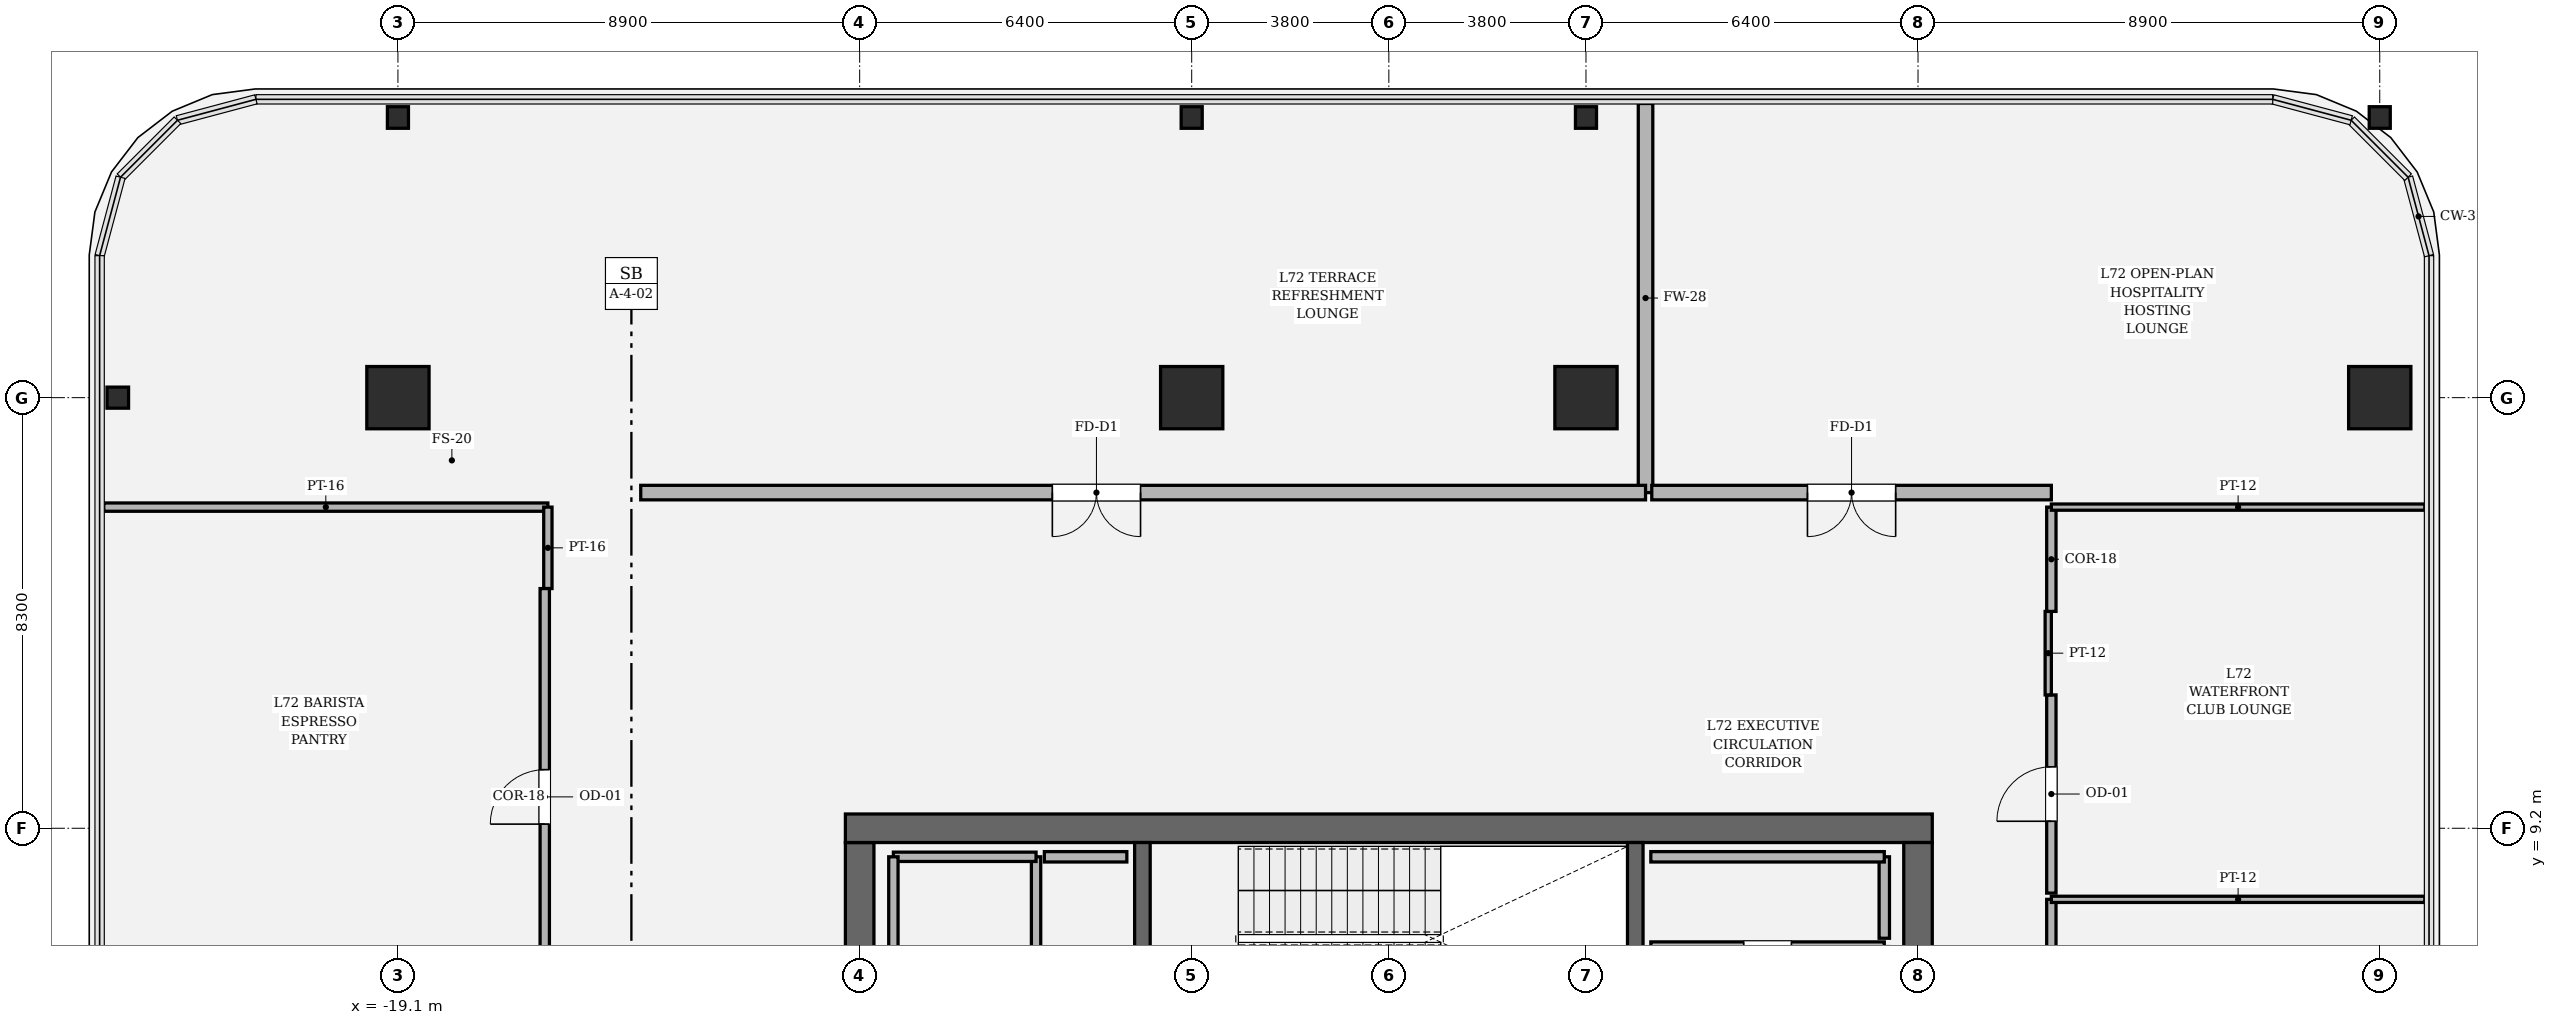
"""IFC4 building model, lengths in metres.
Left out: names, types, materials, properties, quantities, classifications, styles, units other than length and angle.
Written with IfcOpenShell. Run it as: python <this file> out.ifc"""

import sys

from ifc_helpers import new_model, si_unit, direction, frame, frame_2d, origin, origin_2d, place, context, subcontext, project, spatial, rectangle, hollow_rectangle, i_section, extrude, element, fill, save


model = new_model("IFC4")
c1 = context("Model", 3, precision=1e-05, world=origin(), true_north=direction((0.0, 1.0)))
c2 = subcontext(c1, "Body", "Model", "MODEL_VIEW")
j1 = project(units=[si_unit("LENGTHUNIT", "METRE"), si_unit("PLANEANGLEUNIT", "RADIAN")], contexts=[c1])
p1 = place(None, origin())
s1 = spatial("IfcSite", under=j1, at=p1, CompositionType="ELEMENT")
p2 = place(p1, origin())
s2 = spatial("IfcBuilding", under=s1, at=p2, CompositionType="ELEMENT")
p3 = place(p2, frame((0.0, 0.0, 304.8)))
s3 = spatial("IfcBuildingStorey", under=s2, at=p3, CompositionType="ELEMENT", Elevation=304.8)
p4 = place(p3, frame((-10.2, -8.925, 0.0), z_axis=(0.0, 0.0, 1.0), x_axis=(0.0, 1.0, 0.0)))
e1 = element("IfcWall", 1, at=p4, inside=s3, PredefinedType="SHEAR", context=c2, shape_type="SweptSolid", body=[
    extrude(rectangle(XDim=17.85, YDim=0.55, at=frame_2d((8.925, 0.0))), origin(), (0.0, 0.0, 1.0), 4.2),
])
p5 = place(p4, frame((12.715, 0.0, 0.0)))
e2 = element("IfcOpeningElement", 2, at=p5, cuts=e1, PredefinedType="OPENING", context=c2, shape_type="SweptSolid", body=[
    extrude(rectangle(XDim=1.18, YDim=2.2, at=frame_2d((0.59, 1.1))), frame((0.0, 0.285, 0.0), z_axis=(0.0, -1.0, 0.0), x_axis=(1.0, 0.0, 0.0)), (0.0, 0.0, 1.0), 0.57),
])
p6 = place(p3, frame((-10.475, 9.2, 0.0), z_axis=(0.0, 0.0, 1.0), x_axis=(1.0, 0.0, 0.0)))
e3 = element("IfcWall", 3, at=p6, inside=s3, PredefinedType="SHEAR", context=c2, shape_type="SweptSolid", body=[
    extrude(rectangle(XDim=20.95, YDim=0.55, at=frame_2d((10.475, 0.0))), origin(), (0.0, 0.0, 1.0), 4.2),
])
p7 = place(p3, frame((10.2, 8.925, 0.0), z_axis=(0.0, 0.0, 1.0), x_axis=(0.0, -1.0, 0.0)))
e4 = element("IfcWall", 4, at=p7, inside=s3, PredefinedType="SHEAR", context=c2, shape_type="SweptSolid", body=[
    extrude(rectangle(XDim=17.85, YDim=0.55, at=frame_2d((8.925, 0.0))), origin(), (0.0, 0.0, 1.0), 4.2),
])
p8 = place(p7, frame((3.955, 0.0, 0.0)))
e5 = element("IfcOpeningElement", 5, at=p8, cuts=e4, PredefinedType="OPENING", context=c2, shape_type="SweptSolid", body=[
    extrude(rectangle(XDim=1.18, YDim=2.2, at=frame_2d((0.59, 1.1))), frame((0.0, 0.285, 0.0), z_axis=(0.0, -1.0, 0.0), x_axis=(1.0, 0.0, 0.0)), (0.0, 0.0, 1.0), 0.57),
])
for number, where, z_axis, x_axis in (
    (6, (-4.75, 5.3, 0.0), (0.0, 0.0, 1.0), (0.0, 1.0, 0.0)),
    (7, (4.75, 8.925, 0.0), (0.0, 0.0, 1.0), (0.0, -1.0, 0.0)),
):
    element("IfcWall", number, at=place(p3, frame(where, z_axis=z_axis, x_axis=x_axis)), inside=s3, PredefinedType="SOLIDWALL", context=c2, shape_type="SweptSolid", body=[
        extrude(rectangle(XDim=3.625, YDim=0.3, at=frame_2d((1.812, 0.0))), origin(), (0.0, 0.0, 1.0), 4.2),
    ])
for number, where, z_axis, x_axis in (
    (8, (19.1, 17.5, 0.0), (0.0, 0.0, 1.0), (1.0, 0.0, 0.0)),
    (9, (3.8, 17.5, 0.0), (0.0, 0.0, 1.0), (1.0, 0.0, 0.0)),
    (10, (-3.8, 17.5, 0.0), (0.0, 0.0, 1.0), (1.0, 0.0, 0.0)),
    (11, (-19.1, 17.5, 0.0), (0.0, 0.0, 1.0), (1.0, 0.0, 0.0)),
):
    element("IfcColumn", number, at=place(p3, frame(where, z_axis=z_axis, x_axis=x_axis)), inside=s3, PredefinedType="COLUMN", context=c2, shape_type="SweptSolid", body=[
        extrude(hollow_rectangle(XDim=1.2, YDim=1.2, WallThickness=0.035, at=origin_2d()), origin(), (0.0, 0.0, 1.0), 4.2),
    ])
for number, where, z_axis, x_axis in (
    (12, (-19.1, 22.9, 0.0), (0.0, 0.0, 1.0), (1.0, 0.0, 0.0)),
    (13, (-3.8, 22.9, 0.0), (0.0, 0.0, 1.0), (1.0, 0.0, 0.0)),
    (14, (3.8, 22.9, 0.0), (0.0, 0.0, 1.0), (1.0, 0.0, 0.0)),
    (15, (19.1, 22.9, 0.0), (0.0, 0.0, 1.0), (1.0, 0.0, 0.0)),
    (16, (-24.5, 17.5, 0.0), (0.0, 0.0, 1.0), (0.0, 1.0, 0.0)),
):
    element("IfcColumn", number, at=place(p3, frame(where, z_axis=z_axis, x_axis=x_axis)), inside=s3, PredefinedType="COLUMN", context=c2, shape_type="SweptSolid", body=[
        extrude(i_section(OverallWidth=0.406, OverallDepth=0.416, WebThickness=0.029, FlangeThickness=0.048, FilletRadius=0.018, at=origin_2d()), origin(), (0.0, 0.0, 1.0), 4.198),
    ])
p9 = place(p3, frame((-6.8, 5.38, 0.0), z_axis=(0.0, 0.0, 1.0), x_axis=(0.0, 1.0, 0.0)))
e17 = element("IfcWall", 17, at=p9, inside=s3, PredefinedType="PARTITIONING", context=c2, shape_type="SweptSolid", body=[
    extrude(rectangle(XDim=3.27, YDim=0.18, at=frame_2d((1.635, 0.0))), origin(), (0.0, 0.0, 1.0), 4.0),
])
p10 = place(p3, frame((-6.8, 8.65, 0.0), z_axis=(0.0, 0.0, 1.0), x_axis=(-1.0, 0.0, 0.0)))
e18 = element("IfcWall", 18, at=p10, inside=s3, PredefinedType="PARTITIONING", context=c2, shape_type="SweptSolid", body=[
    extrude(rectangle(XDim=2.75, YDim=0.18, at=frame_2d((1.375, 0.0))), origin(), (0.0, 0.0, 1.0), 4.0),
])
p11 = place(p3, frame((-9.55, 8.65, 0.0), z_axis=(0.0, 0.0, 1.0), x_axis=(0.0, -1.0, 0.0)))
e19 = element("IfcWall", 19, at=p11, inside=s3, PredefinedType="PARTITIONING", context=c2, shape_type="SweptSolid", body=[
    extrude(rectangle(XDim=3.27, YDim=0.18, at=frame_2d((1.635, 0.0))), origin(), (0.0, 0.0, 1.0), 4.0),
])
p12 = place(p3, frame((-5.05, 8.65, 0.0), z_axis=(0.0, 0.0, 1.0), x_axis=(-1.0, 0.0, 0.0)))
e20 = element("IfcWall", 20, at=p12, inside=s3, PredefinedType="SOLIDWALL", context=c2, shape_type="SweptSolid", body=[
    extrude(rectangle(XDim=1.59, YDim=0.2, at=frame_2d((0.795, 0.0))), origin(), (0.0, 0.0, 1.0), 4.0),
])
p13 = place(p3, frame((9.55, 6.92, 0.0), z_axis=(0.0, 0.0, 1.0), x_axis=(-1.0, 0.0, 0.0)))
e21 = element("IfcWall", 21, at=p13, inside=s3, PredefinedType="PARTITIONING", context=c2, shape_type="SweptSolid", body=[
    extrude(rectangle(XDim=4.5, YDim=0.18, at=frame_2d((2.25, 0.0))), origin(), (0.0, 0.0, 1.0), 4.0),
])
p14 = place(p13, frame((1.79, 0.0, 0.0)))
e22 = element("IfcOpeningElement", 22, at=p14, cuts=e21, PredefinedType="OPENING", context=c2, shape_type="SweptSolid", body=[
    extrude(rectangle(XDim=0.92, YDim=2.1, at=frame_2d((0.46, 1.05))), frame((0.0, 0.1, 0.0), z_axis=(0.0, -1.0, 0.0), x_axis=(1.0, 0.0, 0.0)), (0.0, 0.0, 1.0), 0.2),
])
p15 = place(p3, frame((9.55, 7.08, 0.0), z_axis=(0.0, 0.0, 1.0), x_axis=(0.0, 1.0, 0.0)))
e23 = element("IfcWall", 23, at=p15, inside=s3, PredefinedType="SOLIDWALL", context=c2, shape_type="SweptSolid", body=[
    extrude(rectangle(XDim=1.57, YDim=0.2, at=frame_2d((0.785, 0.0))), origin(), (0.0, 0.0, 1.0), 4.0),
])
p16 = place(p3, frame((9.55, 8.65, 0.0), z_axis=(0.0, 0.0, 1.0), x_axis=(-1.0, 0.0, 0.0)))
e24 = element("IfcWall", 24, at=p16, inside=s3, PredefinedType="SOLIDWALL", context=c2, shape_type="SweptSolid", body=[
    extrude(rectangle(XDim=4.5, YDim=0.2, at=frame_2d((2.25, 0.0))), origin(), (0.0, 0.0, 1.0), 4.0),
])
p17 = place(p3, frame((12.77, 1.2, 0.0), z_axis=(0.0, 0.0, 1.0), x_axis=(0.0, 1.0, 0.0)))
e25 = element("IfcWall", 25, at=p17, inside=s3, PredefinedType="PARTITIONING", context=c2, shape_type="SweptSolid", body=[
    extrude(rectangle(XDim=6.63, YDim=0.18, at=frame_2d((3.315, 0.0))), origin(), (0.0, 0.0, 1.0), 3.394),
])
p18 = place(p17, frame((2.79, 0.0, 0.0)))
e26 = element("IfcOpeningElement", 26, at=p18, cuts=e25, PredefinedType="OPENING", context=c2, shape_type="SweptSolid", body=[
    extrude(rectangle(XDim=1.05, YDim=2.2, at=frame_2d((0.525, 1.1))), frame((0.0, 0.1, 0.0), z_axis=(0.0, -1.0, 0.0), x_axis=(1.0, 0.0, 0.0)), (0.0, 0.0, 1.0), 0.2),
])
p19 = place(p3, frame((12.77, 7.83, 0.0), z_axis=(0.0, 0.0, 1.0), x_axis=(1.0, 0.0, 0.0)))
e27 = element("IfcWall", 27, at=p19, inside=s3, PredefinedType="PARTITIONING", context=c2, shape_type="SweptSolid", body=[
    extrude(rectangle(XDim=7.2, YDim=0.12, at=frame_2d((3.6, 0.0))), origin(), (0.0, 0.0, 1.0), 3.394),
])
p20 = place(p3, frame((-24.77, 15.39, 0.0), z_axis=(0.0, 0.0, 1.0), x_axis=(1.0, 0.0, 0.0)))
e28 = element("IfcWall", 28, at=p20, inside=s3, PredefinedType="PARTITIONING", context=c2, shape_type="SweptSolid", body=[
    extrude(rectangle(XDim=8.56, YDim=0.16, at=frame_2d((4.28, 0.0))), origin(), (0.0, 0.0, 1.0), 2.714),
])
p21 = place(p3, frame((-16.21, 15.39, 0.0), z_axis=(0.0, 0.0, 1.0), x_axis=(0.0, -1.0, 0.0)))
e29 = element("IfcWall", 29, at=p21, inside=s3, PredefinedType="PARTITIONING", context=c2, shape_type="SweptSolid", body=[
    extrude(rectangle(XDim=1.57, YDim=0.16, at=frame_2d((0.785, 0.0))), origin(), (0.0, 0.0, 1.0), 4.0),
])
p22 = place(p3, frame((-16.27, 13.82, 0.0), z_axis=(0.0, 0.0, 1.0), x_axis=(0.0, -1.0, 0.0)))
e30 = element("IfcWall", 30, at=p22, inside=s3, PredefinedType="PARTITIONING", context=c2, shape_type="SweptSolid", body=[
    extrude(rectangle(XDim=8.03, YDim=0.18, at=frame_2d((4.015, 0.0))), origin(), (0.0, 0.0, 1.0), 3.394),
])
p23 = place(p22, frame((3.49, 0.0, 0.0)))
e31 = element("IfcOpeningElement", 31, at=p23, cuts=e30, PredefinedType="OPENING", context=c2, shape_type="SweptSolid", body=[
    extrude(rectangle(XDim=1.05, YDim=2.2, at=frame_2d((0.525, 1.1))), frame((0.0, 0.1, 0.0), z_axis=(0.0, -1.0, 0.0), x_axis=(1.0, 0.0, 0.0)), (0.0, 0.0, 1.0), 0.2),
])
p24 = place(p3, frame((12.77, 7.95, 0.0), z_axis=(0.0, 0.0, 1.0), x_axis=(0.0, 1.0, 0.0)))
e32 = element("IfcWall", 32, at=p24, inside=s3, PredefinedType="PARTITIONING", context=c2, shape_type="SweptSolid", body=[
    extrude(rectangle(XDim=3.82, YDim=0.18, at=frame_2d((1.91, 0.0))), origin(), (0.0, 0.0, 1.0), 3.394),
])
p25 = place(p24, frame((1.385, 0.0, 0.0)))
e33 = element("IfcOpeningElement", 33, at=p25, cuts=e32, PredefinedType="OPENING", context=c2, shape_type="SweptSolid", body=[
    extrude(rectangle(XDim=1.05, YDim=2.2, at=frame_2d((0.525, 1.1))), frame((0.0, 0.1, 0.0), z_axis=(0.0, -1.0, 0.0), x_axis=(1.0, 0.0, 0.0)), (0.0, 0.0, 1.0), 0.2),
])
p26 = place(p3, frame((12.71, 11.77, 0.0), z_axis=(0.0, 0.0, 1.0), x_axis=(0.0, 1.0, 0.0)))
e34 = element("IfcWall", 34, at=p26, inside=s3, PredefinedType="PARTITIONING", context=c2, shape_type="SweptSolid", body=[
    extrude(rectangle(XDim=1.61, YDim=0.12, at=frame_2d((0.805, 0.0))), origin(), (0.0, 0.0, 1.0), 3.634),
])
p27 = place(p3, frame((12.77, 13.38, 0.0), z_axis=(0.0, 0.0, 1.0), x_axis=(0.0, 1.0, 0.0)))
e35 = element("IfcWall", 35, at=p27, inside=s3, PredefinedType="PARTITIONING", context=c2, shape_type="SweptSolid", body=[
    extrude(rectangle(XDim=2.01, YDim=0.18, at=frame_2d((1.005, 0.0))), origin(), (0.0, 0.0, 1.0), 3.634),
])
p28 = place(p3, frame((12.77, 15.39, 0.0), z_axis=(0.0, 0.0, 1.0), x_axis=(1.0, 0.0, 0.0)))
e36 = element("IfcWall", 36, at=p28, inside=s3, PredefinedType="PARTITIONING", context=c2, shape_type="SweptSolid", body=[
    extrude(rectangle(XDim=7.2, YDim=0.12, at=frame_2d((3.6, 0.0))), origin(), (0.0, 0.0, 1.0), 3.394),
])
p29 = place(p3, frame((4.948, 23.17, 0.0), z_axis=(0.0, 0.0, 1.0), x_axis=(0.0, -1.0, 0.0)))
e37 = element("IfcWall", 37, at=p29, inside=s3, PredefinedType="SOLIDWALL", context=c2, shape_type="SweptSolid", body=[
    extrude(rectangle(XDim=7.5, YDim=0.28, at=frame_2d((3.75, 0.0))), origin(), (0.0, 0.0, 1.0), 2.714),
])
p30 = place(p3, frame((4.948, 15.67, 0.0), z_axis=(0.0, 0.0, 1.0), x_axis=(-1.0, 0.0, 0.0)))
e38 = element("IfcWall", 38, at=p30, inside=s3, PredefinedType="SOLIDWALL", context=c2, shape_type="SweptSolid", body=[
    extrude(rectangle(XDim=19.368, YDim=0.28, at=frame_2d((9.684, 0.0))), origin(), (0.0, 0.0, 1.0), 3.394),
])
p31 = place(p30, frame((9.734, 0.0, 0.0)))
e39 = element("IfcOpeningElement", 39, at=p31, cuts=e38, PredefinedType="OPENING", context=c2, shape_type="SweptSolid", body=[
    extrude(rectangle(XDim=1.7, YDim=2.3, at=frame_2d((0.85, 1.15))), frame((0.0, 0.15, 0.0), z_axis=(0.0, -1.0, 0.0), x_axis=(1.0, 0.0, 0.0)), (0.0, 0.0, 1.0), 0.3),
])
p32 = place(p3, frame((12.77, 15.67, 0.0), z_axis=(0.0, 0.0, 1.0), x_axis=(-1.0, 0.0, 0.0)))
e40 = element("IfcWall", 40, at=p32, inside=s3, PredefinedType="SOLIDWALL", context=c2, shape_type="SweptSolid", body=[
    extrude(rectangle(XDim=7.702, YDim=0.28, at=frame_2d((3.851, 0.0))), origin(), (0.0, 0.0, 1.0), 3.394),
])
p33 = place(p32, frame((3.001, 0.0, 0.0)))
e41 = element("IfcOpeningElement", 41, at=p33, cuts=e40, PredefinedType="OPENING", context=c2, shape_type="SweptSolid", body=[
    extrude(rectangle(XDim=1.7, YDim=2.3, at=frame_2d((0.85, 1.15))), frame((0.0, 0.15, 0.0), z_axis=(0.0, -1.0, 0.0), x_axis=(1.0, 0.0, 0.0)), (0.0, 0.0, 1.0), 0.3),
])
p34 = place(p23, origin())
e42 = element("IfcDoor", 42, at=p34, inside=s3, OperationType="SINGLE_SWING_RIGHT", PredefinedType="DOOR", context=c2, shape_type="SweptSolid", body=[
    extrude(rectangle(XDim=1.05, YDim=2.2, at=frame_2d((0.525, 1.1))), frame((0.0, 0.025, 0.0), z_axis=(0.0, -1.0, 0.0), x_axis=(1.0, 0.0, 0.0)), (0.0, 0.0, 1.0), 0.05),
])
fill(e31, e42)
p35 = place(p25, origin())
e43 = element("IfcDoor", 43, at=p35, inside=s3, OperationType="SINGLE_SWING_LEFT", PredefinedType="DOOR", context=c2, shape_type="SweptSolid", body=[
    extrude(rectangle(XDim=1.05, YDim=2.2, at=frame_2d((0.525, 1.1))), frame((0.0, 0.025, 0.0), z_axis=(0.0, -1.0, 0.0), x_axis=(1.0, 0.0, 0.0)), (0.0, 0.0, 1.0), 0.05),
])
fill(e33, e43)
p36 = place(p31, origin())
e44 = element("IfcDoor", 44, at=p36, inside=s3, OperationType="DOUBLE_DOOR_SINGLE_SWING", PredefinedType="DOOR", context=c2, shape_type="SweptSolid", body=[
    extrude(rectangle(XDim=1.7, YDim=2.3, at=frame_2d((0.85, 1.15))), frame((0.0, 0.025, 0.0), z_axis=(0.0, -1.0, 0.0), x_axis=(1.0, 0.0, 0.0)), (0.0, 0.0, 1.0), 0.05),
])
fill(e39, e44)
p37 = place(p33, origin())
e45 = element("IfcDoor", 45, at=p37, inside=s3, OperationType="DOUBLE_DOOR_SINGLE_SWING", PredefinedType="DOOR", context=c2, shape_type="SweptSolid", body=[
    extrude(rectangle(XDim=1.7, YDim=2.3, at=frame_2d((0.85, 1.15))), frame((0.0, 0.025, 0.0), z_axis=(0.0, -1.0, 0.0), x_axis=(1.0, 0.0, 0.0)), (0.0, 0.0, 1.0), 0.05),
])
fill(e41, e45)
save(model, sys.argv[1])
